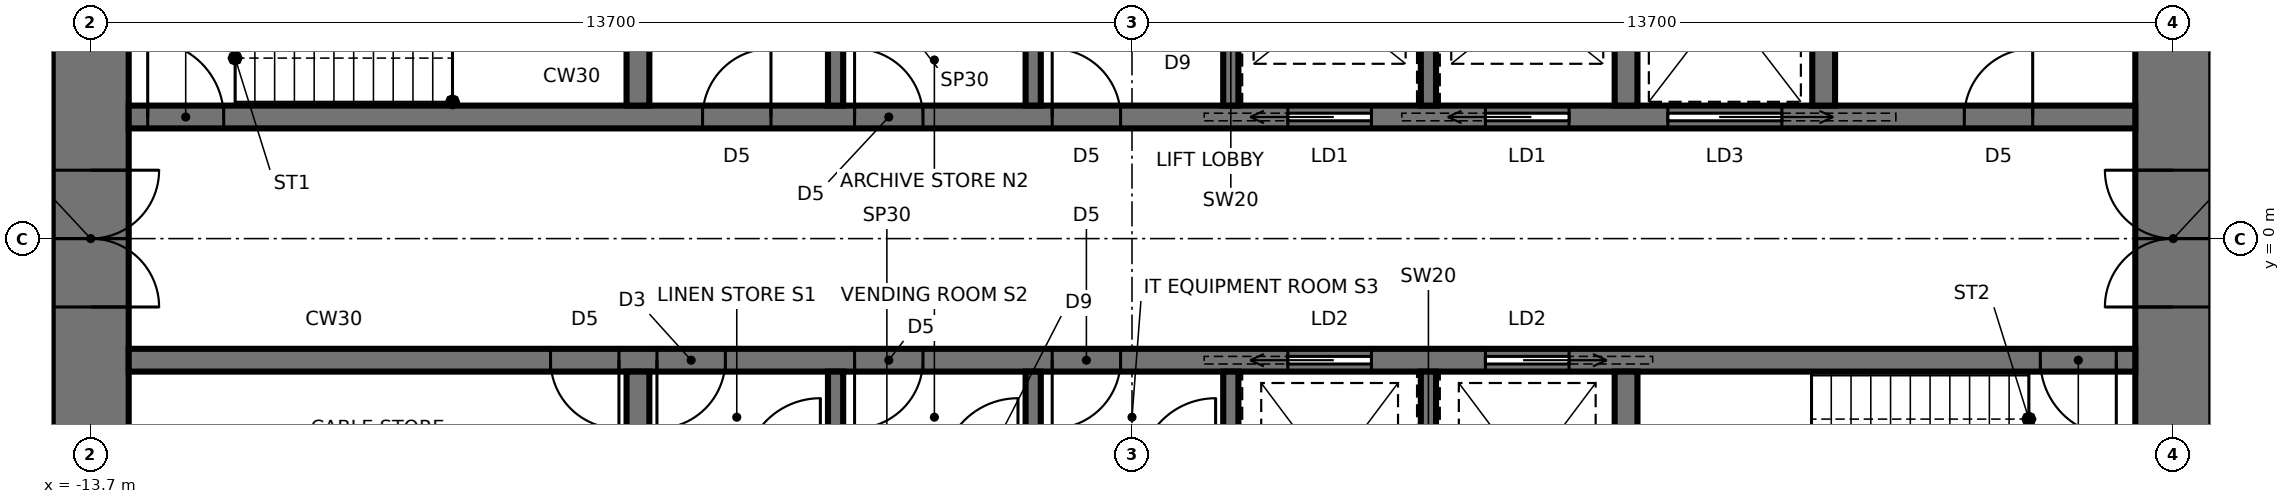
"""IFC4 building model, lengths in metres.
Left out: names, types, materials, properties, quantities, classifications, styles, units other than length and angle.
Written with IfcOpenShell. Run it as: python <this file> out.ifc"""

import sys

from ifc_helpers import new_model, si_unit, direction, frame, frame_2d, origin, place, context, subcontext, project, spatial, rectangle, extrude, element, fill, save


model = new_model("IFC4")
c1 = context("Model", 3, precision=1e-05, world=origin(), true_north=direction((0.0, 1.0)))
c2 = subcontext(c1, "Body", "Model", "MODEL_VIEW")
j1 = project(units=[si_unit("LENGTHUNIT", "METRE"), si_unit("PLANEANGLEUNIT", "RADIAN")], contexts=[c1])
p1 = place(None, origin())
s1 = spatial("IfcSite", under=j1, at=p1, CompositionType="ELEMENT")
p2 = place(p1, origin())
s2 = spatial("IfcBuilding", under=s1, at=p2, CompositionType="ELEMENT")
p3 = place(p2, frame((0.0, 0.0, 264.4)))
s3 = spatial("IfcBuildingStorey", under=s2, at=p3, CompositionType="ELEMENT", Elevation=264.4)
p4 = place(p3, frame((13.7, -9.5, 0.0), z_axis=(0.0, 0.0, 1.0), x_axis=(0.0, 1.0, 0.0)))
e1 = element("IfcWall", 1, at=p4, inside=s3, PredefinedType="SHEAR", context=c2, shape_type="SweptSolid", body=[
    extrude(rectangle(XDim=19.0, YDim=1.0, at=frame_2d((9.5, 0.0))), origin(), (0.0, 0.0, 1.0), 4.2),
])
p5 = place(p4, frame((8.6, 0.0, 0.0)))
e2 = element("IfcOpeningElement", 2, at=p5, cuts=e1, PredefinedType="OPENING", context=c2, shape_type="SweptSolid", body=[
    extrude(rectangle(XDim=1.8, YDim=2.4, at=frame_2d((0.9, 1.2))), frame((0.0, 0.51, 0.0), z_axis=(0.0, -1.0, 0.0), x_axis=(1.0, 0.0, 0.0)), (0.0, 0.0, 1.0), 1.02),
])
p6 = place(p3, frame((-13.7, 9.5, 0.0), z_axis=(0.0, 0.0, 1.0), x_axis=(0.0, -1.0, 0.0)))
e3 = element("IfcWall", 3, at=p6, inside=s3, PredefinedType="SHEAR", context=c2, shape_type="SweptSolid", body=[
    extrude(rectangle(XDim=19.0, YDim=1.0, at=frame_2d((9.5, 0.0))), origin(), (0.0, 0.0, 1.0), 4.2),
])
p7 = place(p6, frame((8.6, 0.0, 0.0)))
e4 = element("IfcOpeningElement", 4, at=p7, cuts=e3, PredefinedType="OPENING", context=c2, shape_type="SweptSolid", body=[
    extrude(rectangle(XDim=1.8, YDim=2.4, at=frame_2d((0.9, 1.2))), frame((0.0, 0.51, 0.0), z_axis=(0.0, -1.0, 0.0), x_axis=(1.0, 0.0, 0.0)), (0.0, 0.0, 1.0), 1.02),
])
p8 = place(p3, frame((-13.2, 1.6, 0.0), z_axis=(0.0, 0.0, 1.0), x_axis=(1.0, 0.0, 0.0)))
e5 = element("IfcWall", 5, at=p8, inside=s3, PredefinedType="SHEAR", context=c2, shape_type="SweptSolid", body=[
    extrude(rectangle(XDim=26.4, YDim=0.3, at=frame_2d((13.2, 0.0))), origin(), (0.0, 0.0, 1.0), 4.2),
])
p9 = place(p8, frame((0.25, 0.0, 0.0)))
e6 = element("IfcOpeningElement", 6, at=p9, cuts=e5, PredefinedType="OPENING", context=c2, shape_type="SweptSolid", body=[
    extrude(rectangle(XDim=1.0, YDim=2.1, at=frame_2d((0.5, 1.05))), frame((0.0, 0.16, 0.0), z_axis=(0.0, -1.0, 0.0), x_axis=(1.0, 0.0, 0.0)), (0.0, 0.0, 1.0), 0.32),
])
p10 = place(p8, frame((20.25, 0.0, 0.0)))
e7 = element("IfcOpeningElement", 7, at=p10, cuts=e5, PredefinedType="OPENING", context=c2, shape_type="SweptSolid", body=[
    extrude(rectangle(XDim=1.5, YDim=2.4, at=frame_2d((0.75, 1.2))), frame((0.0, 0.16, 0.0), z_axis=(0.0, -1.0, 0.0), x_axis=(1.0, 0.0, 0.0)), (0.0, 0.0, 1.0), 0.32),
])
p11 = place(p8, frame((7.55, 0.0, 0.0)))
e8 = element("IfcOpeningElement", 8, at=p11, cuts=e5, PredefinedType="OPENING", context=c2, shape_type="SweptSolid", body=[
    extrude(rectangle(XDim=0.9, YDim=2.1, at=frame_2d((0.45, 1.05))), frame((0.0, 0.16, 0.0), z_axis=(0.0, -1.0, 0.0), x_axis=(1.0, 0.0, 0.0)), (0.0, 0.0, 1.0), 0.32),
])
p12 = place(p8, frame((9.55, 0.0, 0.0)))
e9 = element("IfcOpeningElement", 9, at=p12, cuts=e5, PredefinedType="OPENING", context=c2, shape_type="SweptSolid", body=[
    extrude(rectangle(XDim=0.9, YDim=2.1, at=frame_2d((0.45, 1.05))), frame((0.0, 0.16, 0.0), z_axis=(0.0, -1.0, 0.0), x_axis=(1.0, 0.0, 0.0)), (0.0, 0.0, 1.0), 0.32),
])
p13 = place(p8, frame((12.15, 0.0, 0.0)))
e10 = element("IfcOpeningElement", 10, at=p13, cuts=e5, PredefinedType="OPENING", context=c2, shape_type="SweptSolid", body=[
    extrude(rectangle(XDim=0.9, YDim=2.1, at=frame_2d((0.45, 1.05))), frame((0.0, 0.16, 0.0), z_axis=(0.0, -1.0, 0.0), x_axis=(1.0, 0.0, 0.0)), (0.0, 0.0, 1.0), 0.32),
])
p14 = place(p8, frame((15.25, 0.0, 0.0)))
e11 = element("IfcOpeningElement", 11, at=p14, cuts=e5, PredefinedType="OPENING", context=c2, shape_type="SweptSolid", body=[
    extrude(rectangle(XDim=1.1, YDim=2.3, at=frame_2d((0.55, 1.15))), frame((0.0, 0.16, 0.0), z_axis=(0.0, -1.0, 0.0), x_axis=(1.0, 0.0, 0.0)), (0.0, 0.0, 1.0), 0.32),
])
p15 = place(p8, frame((17.85, 0.0, 0.0)))
e12 = element("IfcOpeningElement", 12, at=p15, cuts=e5, PredefinedType="OPENING", context=c2, shape_type="SweptSolid", body=[
    extrude(rectangle(XDim=1.1, YDim=2.3, at=frame_2d((0.55, 1.15))), frame((0.0, 0.16, 0.0), z_axis=(0.0, -1.0, 0.0), x_axis=(1.0, 0.0, 0.0)), (0.0, 0.0, 1.0), 0.32),
])
p16 = place(p8, frame((24.15, 0.0, 0.0)))
e13 = element("IfcOpeningElement", 13, at=p16, cuts=e5, PredefinedType="OPENING", context=c2, shape_type="SweptSolid", body=[
    extrude(rectangle(XDim=0.9, YDim=2.1, at=frame_2d((0.45, 1.05))), frame((0.0, 0.16, 0.0), z_axis=(0.0, -1.0, 0.0), x_axis=(1.0, 0.0, 0.0)), (0.0, 0.0, 1.0), 0.32),
])
p17 = place(p3, frame((-13.2, -1.6, 0.0), z_axis=(0.0, 0.0, 1.0), x_axis=(1.0, 0.0, 0.0)))
e14 = element("IfcWall", 14, at=p17, inside=s3, PredefinedType="SHEAR", context=c2, shape_type="SweptSolid", body=[
    extrude(rectangle(XDim=26.4, YDim=0.3, at=frame_2d((13.2, 0.0))), origin(), (0.0, 0.0, 1.0), 4.2),
])
p18 = place(p17, frame((25.15, 0.0, 0.0)))
e15 = element("IfcOpeningElement", 15, at=p18, cuts=e14, PredefinedType="OPENING", context=c2, shape_type="SweptSolid", body=[
    extrude(rectangle(XDim=1.0, YDim=2.1, at=frame_2d((0.5, 1.05))), frame((0.0, 0.16, 0.0), z_axis=(0.0, -1.0, 0.0), x_axis=(1.0, 0.0, 0.0)), (0.0, 0.0, 1.0), 0.32),
])
p19 = place(p17, frame((6.95, 0.0, 0.0)))
e16 = element("IfcOpeningElement", 16, at=p19, cuts=e14, PredefinedType="OPENING", context=c2, shape_type="SweptSolid", body=[
    extrude(rectangle(XDim=0.9, YDim=2.1, at=frame_2d((0.45, 1.05))), frame((0.0, 0.16, 0.0), z_axis=(0.0, -1.0, 0.0), x_axis=(1.0, 0.0, 0.0)), (0.0, 0.0, 1.0), 0.32),
])
p20 = place(p17, frame((9.55, 0.0, 0.0)))
e17 = element("IfcOpeningElement", 17, at=p20, cuts=e14, PredefinedType="OPENING", context=c2, shape_type="SweptSolid", body=[
    extrude(rectangle(XDim=0.9, YDim=2.1, at=frame_2d((0.45, 1.05))), frame((0.0, 0.16, 0.0), z_axis=(0.0, -1.0, 0.0), x_axis=(1.0, 0.0, 0.0)), (0.0, 0.0, 1.0), 0.32),
])
p21 = place(p17, frame((12.15, 0.0, 0.0)))
e18 = element("IfcOpeningElement", 18, at=p21, cuts=e14, PredefinedType="OPENING", context=c2, shape_type="SweptSolid", body=[
    extrude(rectangle(XDim=0.9, YDim=2.1, at=frame_2d((0.45, 1.05))), frame((0.0, 0.16, 0.0), z_axis=(0.0, -1.0, 0.0), x_axis=(1.0, 0.0, 0.0)), (0.0, 0.0, 1.0), 0.32),
])
p22 = place(p17, frame((15.25, 0.0, 0.0)))
e19 = element("IfcOpeningElement", 19, at=p22, cuts=e14, PredefinedType="OPENING", context=c2, shape_type="SweptSolid", body=[
    extrude(rectangle(XDim=1.1, YDim=2.3, at=frame_2d((0.55, 1.15))), frame((0.0, 0.16, 0.0), z_axis=(0.0, -1.0, 0.0), x_axis=(1.0, 0.0, 0.0)), (0.0, 0.0, 1.0), 0.32),
])
p23 = place(p17, frame((17.85, 0.0, 0.0)))
e20 = element("IfcOpeningElement", 20, at=p23, cuts=e14, PredefinedType="OPENING", context=c2, shape_type="SweptSolid", body=[
    extrude(rectangle(XDim=1.1, YDim=2.3, at=frame_2d((0.55, 1.15))), frame((0.0, 0.16, 0.0), z_axis=(0.0, -1.0, 0.0), x_axis=(1.0, 0.0, 0.0)), (0.0, 0.0, 1.0), 0.32),
])
p24 = place(p17, frame((5.55, 0.0, 0.0)))
e21 = element("IfcOpeningElement", 21, at=p24, cuts=e14, PredefinedType="OPENING", context=c2, shape_type="SweptSolid", body=[
    extrude(rectangle(XDim=0.9, YDim=2.1, at=frame_2d((0.45, 1.05))), frame((0.0, 0.16, 0.0), z_axis=(0.0, -1.0, 0.0), x_axis=(1.0, 0.0, 0.0)), (0.0, 0.0, 1.0), 0.32),
])
for number, where, z_axis, x_axis in (
    (22, (-6.5, 1.75, 0.0), (0.0, 0.0, 1.0), (0.0, 1.0, 0.0)),
    (23, (6.5, 1.75, 0.0), (0.0, 0.0, 1.0), (0.0, 1.0, 0.0)),
):
    element("IfcWall", number, at=place(p3, frame(where, z_axis=z_axis, x_axis=x_axis)), inside=s3, PredefinedType="SHEAR", context=c2, shape_type="SweptSolid", body=[
        extrude(rectangle(XDim=2.7, YDim=0.3, at=frame_2d((1.35, 0.0))), origin(), (0.0, 0.0, 1.0), 4.2),
    ])
for number, where, z_axis, x_axis in (
    (24, (-3.9, 1.75, 0.0), (0.0, 0.0, 1.0), (0.0, 1.0, 0.0)),
    (25, (-1.3, 1.75, 0.0), (0.0, 0.0, 1.0), (0.0, 1.0, 0.0)),
    (26, (1.3, 1.75, 0.0), (0.0, 0.0, 1.0), (0.0, 1.0, 0.0)),
    (27, (3.9, 1.75, 0.0), (0.0, 0.0, 1.0), (0.0, 1.0, 0.0)),
):
    element("IfcWall", number, at=place(p3, frame(where, z_axis=z_axis, x_axis=x_axis)), inside=s3, PredefinedType="SHEAR", context=c2, shape_type="SweptSolid", body=[
        extrude(rectangle(XDim=2.7, YDim=0.2, at=frame_2d((1.35, 0.0))), origin(), (0.0, 0.0, 1.0), 4.2),
    ])
for number, where, z_axis, x_axis in (
    (28, (-6.5, -1.75, 0.0), (0.0, 0.0, 1.0), (0.0, -1.0, 0.0)),
    (29, (6.5, -1.75, 0.0), (0.0, 0.0, 1.0), (0.0, -1.0, 0.0)),
):
    element("IfcWall", number, at=place(p3, frame(where, z_axis=z_axis, x_axis=x_axis)), inside=s3, PredefinedType="SHEAR", context=c2, shape_type="SweptSolid", body=[
        extrude(rectangle(XDim=2.7, YDim=0.3, at=frame_2d((1.35, 0.0))), origin(), (0.0, 0.0, 1.0), 4.2),
    ])
for number, where, z_axis, x_axis in (
    (30, (-3.9, -1.75, 0.0), (0.0, 0.0, 1.0), (0.0, -1.0, 0.0)),
    (31, (-1.3, -1.75, 0.0), (0.0, 0.0, 1.0), (0.0, -1.0, 0.0)),
    (32, (1.3, -1.75, 0.0), (0.0, 0.0, 1.0), (0.0, -1.0, 0.0)),
    (33, (3.9, -1.75, 0.0), (0.0, 0.0, 1.0), (0.0, -1.0, 0.0)),
):
    element("IfcWall", number, at=place(p3, frame(where, z_axis=z_axis, x_axis=x_axis)), inside=s3, PredefinedType="SHEAR", context=c2, shape_type="SweptSolid", body=[
        extrude(rectangle(XDim=2.7, YDim=0.2, at=frame_2d((1.35, 0.0))), origin(), (0.0, 0.0, 1.0), 4.2),
    ])
p25 = place(p3, frame((9.1, 1.75, 0.0), z_axis=(0.0, 0.0, 1.0), x_axis=(0.0, 1.0, 0.0)))
e34 = element("IfcWall", 34, at=p25, inside=s3, PredefinedType="SHEAR", context=c2, shape_type="SweptSolid", body=[
    extrude(rectangle(XDim=2.7, YDim=0.3, at=frame_2d((1.35, 0.0))), origin(), (0.0, 0.0, 1.0), 4.2),
])
p26 = place(p7, origin())
e35 = element("IfcDoor", 35, at=p26, inside=s3, OperationType="DOUBLE_DOOR_SINGLE_SWING", PredefinedType="DOOR", context=c2, shape_type="SweptSolid", body=[
    extrude(rectangle(XDim=1.72, YDim=2.36, at=frame_2d((0.9, 1.18))), frame((0.0, 0.025, 0.0), z_axis=(0.0, -1.0, 0.0), x_axis=(1.0, 0.0, 0.0)), (0.0, 0.0, 1.0), 0.05),
    extrude(rectangle(XDim=0.04, YDim=2.4, at=frame_2d((0.02, 1.2))), frame((0.0, 0.25, 0.0), z_axis=(0.0, -1.0, 0.0), x_axis=(1.0, 0.0, 0.0)), (0.0, 0.0, 1.0), 0.5),
    extrude(rectangle(XDim=0.04, YDim=2.4, at=frame_2d((1.78, 1.2))), frame((0.0, 0.25, 0.0), z_axis=(0.0, -1.0, 0.0), x_axis=(1.0, 0.0, 0.0)), (0.0, 0.0, 1.0), 0.5),
    extrude(rectangle(XDim=1.72, YDim=0.04, at=frame_2d((0.9, 2.38))), frame((0.0, 0.25, 0.0), z_axis=(0.0, -1.0, 0.0), x_axis=(1.0, 0.0, 0.0)), (0.0, 0.0, 1.0), 0.5),
])
fill(e4, e35)
p27 = place(p5, origin())
e36 = element("IfcDoor", 36, at=p27, inside=s3, OperationType="DOUBLE_DOOR_SINGLE_SWING", PredefinedType="DOOR", context=c2, shape_type="SweptSolid", body=[
    extrude(rectangle(XDim=1.72, YDim=2.36, at=frame_2d((0.9, 1.18))), frame((0.0, 0.025, 0.0), z_axis=(0.0, -1.0, 0.0), x_axis=(1.0, 0.0, 0.0)), (0.0, 0.0, 1.0), 0.05),
    extrude(rectangle(XDim=0.04, YDim=2.4, at=frame_2d((0.02, 1.2))), frame((0.0, 0.25, 0.0), z_axis=(0.0, -1.0, 0.0), x_axis=(1.0, 0.0, 0.0)), (0.0, 0.0, 1.0), 0.5),
    extrude(rectangle(XDim=0.04, YDim=2.4, at=frame_2d((1.78, 1.2))), frame((0.0, 0.25, 0.0), z_axis=(0.0, -1.0, 0.0), x_axis=(1.0, 0.0, 0.0)), (0.0, 0.0, 1.0), 0.5),
    extrude(rectangle(XDim=1.72, YDim=0.04, at=frame_2d((0.9, 2.38))), frame((0.0, 0.25, 0.0), z_axis=(0.0, -1.0, 0.0), x_axis=(1.0, 0.0, 0.0)), (0.0, 0.0, 1.0), 0.5),
])
fill(e2, e36)
p28 = place(p9, origin())
e37 = element("IfcDoor", 37, at=p28, inside=s3, OperationType="SINGLE_SWING_LEFT", PredefinedType="DOOR", context=c2, shape_type="SweptSolid", body=[
    extrude(rectangle(XDim=1.0, YDim=2.1, at=frame_2d((0.5, 1.05))), frame((0.0, 0.025, 0.0), z_axis=(0.0, -1.0, 0.0), x_axis=(1.0, 0.0, 0.0)), (0.0, 0.0, 1.0), 0.05),
])
fill(e6, e37)
p29 = place(p18, frame((1.0, 0.0, 0.0), z_axis=(0.0, 0.0, 1.0), x_axis=(-1.0, 0.0, 0.0)))
e38 = element("IfcDoor", 38, at=p29, inside=s3, OperationType="SINGLE_SWING_LEFT", PredefinedType="DOOR", context=c2, shape_type="SweptSolid", body=[
    extrude(rectangle(XDim=1.0, YDim=2.1, at=frame_2d((0.5, 1.05))), frame((0.0, 0.025, 0.0), z_axis=(0.0, -1.0, 0.0), x_axis=(1.0, 0.0, 0.0)), (0.0, 0.0, 1.0), 0.05),
])
fill(e15, e38)
p30 = place(p10, origin())
e39 = element("IfcDoor", 39, at=p30, inside=s3, OperationType="SLIDING_TO_RIGHT", PredefinedType="DOOR", context=c2, shape_type="SweptSolid", body=[
    extrude(rectangle(XDim=1.5, YDim=2.4, at=frame_2d((0.75, 1.2))), frame((0.0, 0.025, 0.0), z_axis=(0.0, -1.0, 0.0), x_axis=(1.0, 0.0, 0.0)), (0.0, 0.0, 1.0), 0.05),
])
fill(e7, e39)
p31 = place(p11, origin())
e40 = element("IfcDoor", 40, at=p31, inside=s3, OperationType="SINGLE_SWING_RIGHT", PredefinedType="DOOR", context=c2, shape_type="SweptSolid", body=[
    extrude(rectangle(XDim=0.9, YDim=2.1, at=frame_2d((0.45, 1.05))), frame((0.0, 0.025, 0.0), z_axis=(0.0, -1.0, 0.0), x_axis=(1.0, 0.0, 0.0)), (0.0, 0.0, 1.0), 0.05),
])
fill(e8, e40)
p32 = place(p12, origin())
e41 = element("IfcDoor", 41, at=p32, inside=s3, OperationType="SINGLE_SWING_LEFT", PredefinedType="DOOR", context=c2, shape_type="SweptSolid", body=[
    extrude(rectangle(XDim=0.9, YDim=2.1, at=frame_2d((0.45, 1.05))), frame((0.0, 0.025, 0.0), z_axis=(0.0, -1.0, 0.0), x_axis=(1.0, 0.0, 0.0)), (0.0, 0.0, 1.0), 0.05),
])
fill(e9, e41)
p33 = place(p13, origin())
e42 = element("IfcDoor", 42, at=p33, inside=s3, OperationType="SINGLE_SWING_LEFT", PredefinedType="DOOR", context=c2, shape_type="SweptSolid", body=[
    extrude(rectangle(XDim=0.9, YDim=2.1, at=frame_2d((0.45, 1.05))), frame((0.0, 0.025, 0.0), z_axis=(0.0, -1.0, 0.0), x_axis=(1.0, 0.0, 0.0)), (0.0, 0.0, 1.0), 0.05),
])
fill(e10, e42)
p34 = place(p14, origin())
e43 = element("IfcDoor", 43, at=p34, inside=s3, OperationType="SLIDING_TO_LEFT", PredefinedType="DOOR", context=c2, shape_type="SweptSolid", body=[
    extrude(rectangle(XDim=1.1, YDim=2.3, at=frame_2d((0.55, 1.15))), frame((0.0, 0.025, 0.0), z_axis=(0.0, -1.0, 0.0), x_axis=(1.0, 0.0, 0.0)), (0.0, 0.0, 1.0), 0.05),
])
fill(e11, e43)
p35 = place(p15, origin())
e44 = element("IfcDoor", 44, at=p35, inside=s3, OperationType="SLIDING_TO_LEFT", PredefinedType="DOOR", context=c2, shape_type="SweptSolid", body=[
    extrude(rectangle(XDim=1.1, YDim=2.3, at=frame_2d((0.55, 1.15))), frame((0.0, 0.025, 0.0), z_axis=(0.0, -1.0, 0.0), x_axis=(1.0, 0.0, 0.0)), (0.0, 0.0, 1.0), 0.05),
])
fill(e12, e44)
p36 = place(p19, frame((0.9, 0.0, 0.0), z_axis=(0.0, 0.0, 1.0), x_axis=(-1.0, 0.0, 0.0)))
e45 = element("IfcDoor", 45, at=p36, inside=s3, OperationType="SINGLE_SWING_RIGHT", PredefinedType="DOOR", context=c2, shape_type="SweptSolid", body=[
    extrude(rectangle(XDim=0.9, YDim=2.1, at=frame_2d((0.45, 1.05))), frame((0.0, 0.025, 0.0), z_axis=(0.0, -1.0, 0.0), x_axis=(1.0, 0.0, 0.0)), (0.0, 0.0, 1.0), 0.05),
])
fill(e16, e45)
p37 = place(p20, frame((0.9, 0.0, 0.0), z_axis=(0.0, 0.0, 1.0), x_axis=(-1.0, 0.0, 0.0)))
e46 = element("IfcDoor", 46, at=p37, inside=s3, OperationType="SINGLE_SWING_RIGHT", PredefinedType="DOOR", context=c2, shape_type="SweptSolid", body=[
    extrude(rectangle(XDim=0.9, YDim=2.1, at=frame_2d((0.45, 1.05))), frame((0.0, 0.025, 0.0), z_axis=(0.0, -1.0, 0.0), x_axis=(1.0, 0.0, 0.0)), (0.0, 0.0, 1.0), 0.05),
])
fill(e17, e46)
p38 = place(p21, frame((0.9, 0.0, 0.0), z_axis=(0.0, 0.0, 1.0), x_axis=(-1.0, 0.0, 0.0)))
e47 = element("IfcDoor", 47, at=p38, inside=s3, OperationType="SINGLE_SWING_RIGHT", PredefinedType="DOOR", context=c2, shape_type="SweptSolid", body=[
    extrude(rectangle(XDim=0.9, YDim=2.1, at=frame_2d((0.45, 1.05))), frame((0.0, 0.025, 0.0), z_axis=(0.0, -1.0, 0.0), x_axis=(1.0, 0.0, 0.0)), (0.0, 0.0, 1.0), 0.05),
])
fill(e18, e47)
p39 = place(p22, frame((1.1, 0.0, 0.0), z_axis=(0.0, 0.0, 1.0), x_axis=(-1.0, 0.0, 0.0)))
e48 = element("IfcDoor", 48, at=p39, inside=s3, OperationType="SLIDING_TO_RIGHT", PredefinedType="DOOR", context=c2, shape_type="SweptSolid", body=[
    extrude(rectangle(XDim=1.1, YDim=2.3, at=frame_2d((0.55, 1.15))), frame((0.0, 0.025, 0.0), z_axis=(0.0, -1.0, 0.0), x_axis=(1.0, 0.0, 0.0)), (0.0, 0.0, 1.0), 0.05),
])
fill(e19, e48)
p40 = place(p23, frame((1.1, 0.0, 0.0), z_axis=(0.0, 0.0, 1.0), x_axis=(-1.0, 0.0, 0.0)))
e49 = element("IfcDoor", 49, at=p40, inside=s3, OperationType="SLIDING_TO_LEFT", PredefinedType="DOOR", context=c2, shape_type="SweptSolid", body=[
    extrude(rectangle(XDim=1.1, YDim=2.3, at=frame_2d((0.55, 1.15))), frame((0.0, 0.025, 0.0), z_axis=(0.0, -1.0, 0.0), x_axis=(1.0, 0.0, 0.0)), (0.0, 0.0, 1.0), 0.05),
])
fill(e20, e49)
p41 = place(p16, origin())
e50 = element("IfcDoor", 50, at=p41, inside=s3, OperationType="SINGLE_SWING_RIGHT", PredefinedType="DOOR", context=c2, shape_type="SweptSolid", body=[
    extrude(rectangle(XDim=0.9, YDim=2.1, at=frame_2d((0.45, 1.05))), frame((0.0, 0.025, 0.0), z_axis=(0.0, -1.0, 0.0), x_axis=(1.0, 0.0, 0.0)), (0.0, 0.0, 1.0), 0.05),
])
fill(e13, e50)
p42 = place(p24, frame((0.9, 0.0, 0.0), z_axis=(0.0, 0.0, 1.0), x_axis=(-1.0, 0.0, 0.0)))
e51 = element("IfcDoor", 51, at=p42, inside=s3, OperationType="SINGLE_SWING_LEFT", PredefinedType="DOOR", context=c2, shape_type="SweptSolid", body=[
    extrude(rectangle(XDim=0.9, YDim=2.1, at=frame_2d((0.45, 1.05))), frame((0.0, 0.025, 0.0), z_axis=(0.0, -1.0, 0.0), x_axis=(1.0, 0.0, 0.0)), (0.0, 0.0, 1.0), 0.05),
])
fill(e21, e51)
save(model, sys.argv[1])
